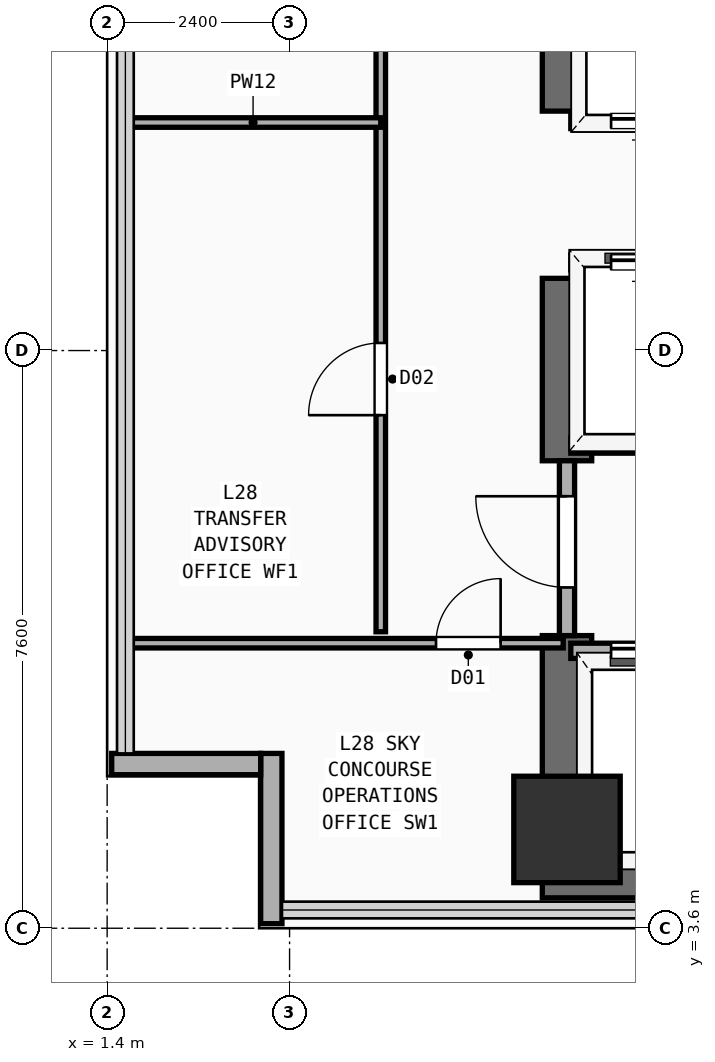
"""IFC4 building model, lengths in metres.
Left out: names, types, materials, properties, quantities, classifications, styles, units other than length and angle.
Written with IfcOpenShell. Run it as: python <this file> out.ifc"""

import sys

from ifc_helpers import new_model, si_unit, direction, frame, frame_2d, origin, origin_2d, place, context, subcontext, project, spatial, rectangle, extrude, element, fill, save


model = new_model("IFC4")
c1 = context("Model", 3, precision=1e-05, world=origin(), true_north=direction((0.0, 1.0)))
c2 = subcontext(c1, "Body", "Model", "MODEL_VIEW")
j1 = project(units=[si_unit("LENGTHUNIT", "METRE"), si_unit("PLANEANGLEUNIT", "RADIAN")], contexts=[c1])
p1 = place(None, origin())
s1 = spatial("IfcSite", under=j1, at=p1, CompositionType="ELEMENT")
p2 = place(p1, origin())
s2 = spatial("IfcBuilding", under=s1, at=p2, CompositionType="ELEMENT")
p3 = place(p2, frame((0.0, 0.0, 110.7)))
s3 = spatial("IfcBuildingStorey", under=s2, at=p3, CompositionType="ELEMENT", Elevation=110.7)
p4 = place(p3, frame((7.125, 4.325, 0.0), z_axis=(0.0, 0.0, 1.0), x_axis=(1.0, 0.0, 0.0)))
e1 = element("IfcWall", 1, at=p4, inside=s3, PredefinedType="SHEAR", context=c2, shape_type="SweptSolid", body=[
    extrude(rectangle(XDim=14.0, YDim=0.65, at=frame_2d((7.0, 0.0))), origin(), (0.0, 0.0, 1.0), 3.54),
])
p5 = place(p3, frame((7.45, 4.65, 0.0), z_axis=(0.0, 0.0, 1.0), x_axis=(0.0, 1.0, 0.0)))
e2 = element("IfcWall", 2, at=p5, inside=s3, PredefinedType="SHEAR", context=c2, shape_type="SweptSolid", body=[
    extrude(rectangle(XDim=2.8, YDim=0.65, at=frame_2d((1.4, 0.0))), origin(), (0.0, 0.0, 1.0), 3.54),
])
p6 = place(p3, frame((7.45, 9.75, 0.0), z_axis=(0.0, 0.0, 1.0), x_axis=(0.0, 1.0, 0.0)))
e3 = element("IfcWall", 3, at=p6, inside=s3, PredefinedType="SHEAR", context=c2, shape_type="SweptSolid", body=[
    extrude(rectangle(XDim=2.4, YDim=0.65, at=frame_2d((1.2, 0.0))), origin(), (0.0, 0.0, 1.0), 3.54),
])
p7 = place(p3, frame((7.45, 14.35, 0.0), z_axis=(0.0, 0.0, 1.0), x_axis=(0.0, 1.0, 0.0)))
e4 = element("IfcWall", 4, at=p7, inside=s3, PredefinedType="SHEAR", context=c2, shape_type="SweptSolid", body=[
    extrude(rectangle(XDim=4.81, YDim=0.65, at=frame_2d((2.405, 0.0))), origin(), (0.0, 0.0, 1.0), 3.54),
])
p8 = place(p3, frame((7.45, 4.9, 0.0), z_axis=(0.0, 0.0, 1.0), x_axis=(1.0, 0.0, 0.0)))
e5 = element("IfcColumn", 5, at=p8, inside=s3, PredefinedType="COLUMN", context=c2, shape_type="SweptSolid", body=[
    extrude(rectangle(XDim=1.4, YDim=1.4, at=origin_2d()), origin(), (0.0, 0.0, 1.0), 3.54),
])
p9 = place(p3, frame((3.56, 3.66, 0.0), z_axis=(0.0, 0.0, 1.0), x_axis=(0.0, 1.0, 0.0)))
e6 = element("IfcWall", 6, at=p9, inside=s3, PredefinedType="SOLIDWALL", context=c2, shape_type="SweptSolid", body=[
    extrude(rectangle(XDim=2.24, YDim=0.28, at=frame_2d((1.12, 0.0))), origin(), (0.0, 0.0, 1.0), 3.54),
])
p10 = place(p3, frame((1.46, 5.76, 0.0), z_axis=(0.0, 0.0, 1.0), x_axis=(1.0, 0.0, 0.0)))
e7 = element("IfcWall", 7, at=p10, inside=s3, PredefinedType="SOLIDWALL", context=c2, shape_type="SweptSolid", body=[
    extrude(rectangle(XDim=1.96, YDim=0.28, at=frame_2d((0.98, 0.0))), origin(), (0.0, 0.0, 1.0), 3.54),
])
p11 = place(p3, frame((7.5, 7.25, 0.0), z_axis=(0.0, 0.0, 1.0), x_axis=(1.0, 0.0, 0.0)))
e8 = element("IfcWall", 8, at=p11, inside=s3, PredefinedType="PARTITIONING", context=c2, shape_type="SweptSolid", body=[
    extrude(rectangle(XDim=8.35, YDim=0.2, at=frame_2d((4.175, 0.0))), origin(), (0.0, 0.0, 1.0), 3.54),
])
p12 = place(p11, frame((0.53, 0.0, 0.0)))
e9 = element("IfcOpeningElement", 9, at=p12, cuts=e8, PredefinedType="OPENING", context=c2, shape_type="SweptSolid", body=[
    extrude(rectangle(XDim=1.1, YDim=2.2, at=frame_2d((0.55, 1.1))), frame((0.0, 0.11, 0.0), z_axis=(0.0, -1.0, 0.0), x_axis=(1.0, 0.0, 0.0)), (0.0, 0.0, 1.0), 0.22),
])
p13 = place(p11, frame((2.37, 0.0, 0.0)))
e10 = element("IfcOpeningElement", 10, at=p13, cuts=e8, PredefinedType="OPENING", context=c2, shape_type="SweptSolid", body=[
    extrude(rectangle(XDim=1.1, YDim=2.2, at=frame_2d((0.55, 1.1))), frame((0.0, 0.11, 0.0), z_axis=(0.0, -1.0, 0.0), x_axis=(1.0, 0.0, 0.0)), (0.0, 0.0, 1.0), 0.22),
])
p14 = place(p11, frame((4.33, 0.0, 0.0)))
e11 = element("IfcOpeningElement", 11, at=p14, cuts=e8, PredefinedType="OPENING", context=c2, shape_type="SweptSolid", body=[
    extrude(rectangle(XDim=1.1, YDim=2.2, at=frame_2d((0.55, 1.1))), frame((0.0, 0.11, 0.0), z_axis=(0.0, -1.0, 0.0), x_axis=(1.0, 0.0, 0.0)), (0.0, 0.0, 1.0), 0.22),
])
p15 = place(p11, frame((6.5, 0.0, 0.0)))
e12 = element("IfcOpeningElement", 12, at=p15, cuts=e8, PredefinedType="OPENING", context=c2, shape_type="SweptSolid", body=[
    extrude(rectangle(XDim=1.1, YDim=2.2, at=frame_2d((0.55, 1.1))), frame((0.0, 0.11, 0.0), z_axis=(0.0, -1.0, 0.0), x_axis=(1.0, 0.0, 0.0)), (0.0, 0.0, 1.0), 0.22),
])
p16 = place(p3, frame((7.5, 9.95, 0.0), z_axis=(0.0, 0.0, 1.0), x_axis=(1.0, 0.0, 0.0)))
e13 = element("IfcWall", 13, at=p16, inside=s3, PredefinedType="PARTITIONING", context=c2, shape_type="SweptSolid", body=[
    extrude(rectangle(XDim=8.35, YDim=0.2, at=frame_2d((4.175, 0.0))), origin(), (0.0, 0.0, 1.0), 3.54),
])
p17 = place(p3, frame((7.45, 7.45, 0.0), z_axis=(0.0, 0.0, 1.0), x_axis=(0.0, 1.0, 0.0)))
e14 = element("IfcWall", 14, at=p17, inside=s3, PredefinedType="PARTITIONING", context=c2, shape_type="SweptSolid", body=[
    extrude(rectangle(XDim=2.3, YDim=0.2, at=frame_2d((1.15, 0.0))), origin(), (0.0, 0.0, 1.0), 2.52),
])
p18 = place(p17, frame((0.633, 0.0, 0.0)))
e15 = element("IfcOpeningElement", 15, at=p18, cuts=e14, PredefinedType="OPENING", context=c2, shape_type="SweptSolid", body=[
    extrude(rectangle(XDim=1.2, YDim=2.25, at=frame_2d((0.6, 1.125))), frame((0.0, 0.11, 0.0), z_axis=(0.0, -1.0, 0.0), x_axis=(1.0, 0.0, 0.0)), (0.0, 0.0, 1.0), 0.22),
])
p19 = place(p3, frame((7.5, 12.36, 0.0), z_axis=(0.0, 0.0, 1.0), x_axis=(1.0, 0.0, 0.0)))
e16 = element("IfcWall", 16, at=p19, inside=s3, PredefinedType="PARTITIONING", context=c2, shape_type="SweptSolid", body=[
    extrude(rectangle(XDim=7.85, YDim=0.2, at=frame_2d((3.925, 0.0))), origin(), (0.0, 0.0, 1.0), 3.54),
])
p20 = place(p19, frame((0.53, 0.0, 0.0)))
e17 = element("IfcOpeningElement", 17, at=p20, cuts=e16, PredefinedType="OPENING", context=c2, shape_type="SweptSolid", body=[
    extrude(rectangle(XDim=1.1, YDim=2.2, at=frame_2d((0.55, 1.1))), frame((0.0, 0.11, 0.0), z_axis=(0.0, -1.0, 0.0), x_axis=(1.0, 0.0, 0.0)), (0.0, 0.0, 1.0), 0.22),
])
p21 = place(p19, frame((2.42, 0.0, 0.0)))
e18 = element("IfcOpeningElement", 18, at=p21, cuts=e16, PredefinedType="OPENING", context=c2, shape_type="SweptSolid", body=[
    extrude(rectangle(XDim=1.1, YDim=2.2, at=frame_2d((0.55, 1.1))), frame((0.0, 0.11, 0.0), z_axis=(0.0, -1.0, 0.0), x_axis=(1.0, 0.0, 0.0)), (0.0, 0.0, 1.0), 0.22),
])
p22 = place(p19, frame((4.31, 0.0, 0.0)))
e19 = element("IfcOpeningElement", 19, at=p22, cuts=e16, PredefinedType="OPENING", context=c2, shape_type="SweptSolid", body=[
    extrude(rectangle(XDim=1.1, YDim=2.2, at=frame_2d((0.55, 1.1))), frame((0.0, 0.11, 0.0), z_axis=(0.0, -1.0, 0.0), x_axis=(1.0, 0.0, 0.0)), (0.0, 0.0, 1.0), 0.22),
])
p23 = place(p19, frame((6.2, 0.0, 0.0)))
e20 = element("IfcOpeningElement", 20, at=p23, cuts=e16, PredefinedType="OPENING", context=c2, shape_type="SweptSolid", body=[
    extrude(rectangle(XDim=1.1, YDim=2.2, at=frame_2d((0.55, 1.1))), frame((0.0, 0.11, 0.0), z_axis=(0.0, -1.0, 0.0), x_axis=(1.0, 0.0, 0.0)), (0.0, 0.0, 1.0), 0.22),
])
p24 = place(p3, frame((7.5, 14.22, 0.0), z_axis=(0.0, 0.0, 1.0), x_axis=(1.0, 0.0, 0.0)))
e21 = element("IfcWall", 21, at=p24, inside=s3, PredefinedType="PARTITIONING", context=c2, shape_type="SweptSolid", body=[
    extrude(rectangle(XDim=7.85, YDim=0.2, at=frame_2d((3.925, 0.0))), origin(), (0.0, 0.0, 1.0), 3.54),
])
p25 = place(p24, frame((0.53, 0.0, 0.0)))
e22 = element("IfcOpeningElement", 22, at=p25, cuts=e21, PredefinedType="OPENING", context=c2, shape_type="SweptSolid", body=[
    extrude(rectangle(XDim=1.1, YDim=2.2, at=frame_2d((0.55, 1.1))), frame((0.0, 0.11, 0.0), z_axis=(0.0, -1.0, 0.0), x_axis=(1.0, 0.0, 0.0)), (0.0, 0.0, 1.0), 0.22),
])
p26 = place(p24, frame((2.42, 0.0, 0.0)))
e23 = element("IfcOpeningElement", 23, at=p26, cuts=e21, PredefinedType="OPENING", context=c2, shape_type="SweptSolid", body=[
    extrude(rectangle(XDim=1.1, YDim=2.2, at=frame_2d((0.55, 1.1))), frame((0.0, 0.11, 0.0), z_axis=(0.0, -1.0, 0.0), x_axis=(1.0, 0.0, 0.0)), (0.0, 0.0, 1.0), 0.22),
])
p27 = place(p24, frame((4.31, 0.0, 0.0)))
e24 = element("IfcOpeningElement", 24, at=p27, cuts=e21, PredefinedType="OPENING", context=c2, shape_type="SweptSolid", body=[
    extrude(rectangle(XDim=1.1, YDim=2.2, at=frame_2d((0.55, 1.1))), frame((0.0, 0.11, 0.0), z_axis=(0.0, -1.0, 0.0), x_axis=(1.0, 0.0, 0.0)), (0.0, 0.0, 1.0), 0.22),
])
p28 = place(p24, frame((6.2, 0.0, 0.0)))
e25 = element("IfcOpeningElement", 25, at=p28, cuts=e21, PredefinedType="OPENING", context=c2, shape_type="SweptSolid", body=[
    extrude(rectangle(XDim=1.1, YDim=2.2, at=frame_2d((0.55, 1.1))), frame((0.0, 0.11, 0.0), z_axis=(0.0, -1.0, 0.0), x_axis=(1.0, 0.0, 0.0)), (0.0, 0.0, 1.0), 0.22),
])
p29 = place(p3, frame((1.64, 7.35, 0.0), z_axis=(0.0, 0.0, 1.0), x_axis=(1.0, 0.0, 0.0)))
e26 = element("IfcWall", 26, at=p29, inside=s3, PredefinedType="PARTITIONING", context=c2, shape_type="SweptSolid", body=[
    extrude(rectangle(XDim=5.76, YDim=0.125, at=frame_2d((2.88, 0.0))), origin(), (0.0, 0.0, 1.0), 3.54),
])
p30 = place(p29, frame((4.087, 0.0, 0.0)))
e27 = element("IfcOpeningElement", 27, at=p30, cuts=e26, PredefinedType="OPENING", context=c2, shape_type="SweptSolid", body=[
    extrude(rectangle(XDim=0.85, YDim=2.15, at=frame_2d((0.425, 1.075))), frame((0.0, 0.073, 0.0), z_axis=(0.0, -1.0, 0.0), x_axis=(1.0, 0.0, 0.0)), (0.0, 0.0, 1.0), 0.145),
])
p31 = place(p3, frame((5.0, 7.5, 0.0), z_axis=(0.0, 0.0, 1.0), x_axis=(0.0, 1.0, 0.0)))
e28 = element("IfcWall", 28, at=p31, inside=s3, PredefinedType="PARTITIONING", context=c2, shape_type="SweptSolid", body=[
    extrude(rectangle(XDim=17.75, YDim=0.125, at=frame_2d((8.875, 0.0))), origin(), (0.0, 0.0, 1.0), 3.54),
])
p32 = place(p31, frame((2.85, 0.0, 0.0)))
e29 = element("IfcOpeningElement", 29, at=p32, cuts=e28, PredefinedType="OPENING", context=c2, shape_type="SweptSolid", body=[
    extrude(rectangle(XDim=0.95, YDim=2.15, at=frame_2d((0.475, 1.075))), frame((0.0, 0.073, 0.0), z_axis=(0.0, -1.0, 0.0), x_axis=(1.0, 0.0, 0.0)), (0.0, 0.0, 1.0), 0.145),
])
p33 = place(p31, frame((11.821, 0.0, 0.0)))
e30 = element("IfcOpeningElement", 30, at=p33, cuts=e28, PredefinedType="OPENING", context=c2, shape_type="SweptSolid", body=[
    extrude(rectangle(XDim=0.95, YDim=2.15, at=frame_2d((0.475, 1.075))), frame((0.0, 0.073, 0.0), z_axis=(0.0, -1.0, 0.0), x_axis=(1.0, 0.0, 0.0)), (0.0, 0.0, 1.0), 0.145),
])
p34 = place(p3, frame((1.64, 14.2, 0.0), z_axis=(0.0, 0.0, 1.0), x_axis=(1.0, 0.0, 0.0)))
e31 = element("IfcWall", 31, at=p34, inside=s3, PredefinedType="PARTITIONING", context=c2, shape_type="SweptSolid", body=[
    extrude(rectangle(XDim=3.36, YDim=0.125, at=frame_2d((1.68, 0.0))), origin(), (0.0, 0.0, 1.0), 3.54),
])
p35 = place(p12, origin())
e32 = element("IfcDoor", 32, at=p35, inside=s3, OperationType="SLIDING_TO_LEFT", PredefinedType="DOOR", context=c2, shape_type="SweptSolid", body=[
    extrude(rectangle(XDim=1.1, YDim=2.2, at=frame_2d((0.55, 1.1))), frame((0.0, 0.025, 0.0), z_axis=(0.0, -1.0, 0.0), x_axis=(1.0, 0.0, 0.0)), (0.0, 0.0, 1.0), 0.05),
])
fill(e9, e32)
p36 = place(p18, frame((1.2, 0.0, 0.0), z_axis=(0.0, 0.0, 1.0), x_axis=(-1.0, 0.0, 0.0)))
e33 = element("IfcDoor", 33, at=p36, inside=s3, OperationType="SINGLE_SWING_LEFT", PredefinedType="DOOR", context=c2, shape_type="SweptSolid", body=[
    extrude(rectangle(XDim=1.2, YDim=2.25, at=frame_2d((0.6, 1.125))), frame((0.0, 0.025, 0.0), z_axis=(0.0, -1.0, 0.0), x_axis=(1.0, 0.0, 0.0)), (0.0, 0.0, 1.0), 0.05),
])
fill(e15, e33)
p37 = place(p20, origin())
e34 = element("IfcDoor", 34, at=p37, inside=s3, OperationType="SLIDING_TO_LEFT", PredefinedType="DOOR", context=c2, shape_type="SweptSolid", body=[
    extrude(rectangle(XDim=1.1, YDim=2.2, at=frame_2d((0.55, 1.1))), frame((0.0, 0.025, 0.0), z_axis=(0.0, -1.0, 0.0), x_axis=(1.0, 0.0, 0.0)), (0.0, 0.0, 1.0), 0.05),
])
fill(e17, e34)
p38 = place(p25, frame((1.1, 0.0, 0.0), z_axis=(0.0, 0.0, 1.0), x_axis=(-1.0, 0.0, 0.0)))
e35 = element("IfcDoor", 35, at=p38, inside=s3, OperationType="SLIDING_TO_LEFT", PredefinedType="DOOR", context=c2, shape_type="SweptSolid", body=[
    extrude(rectangle(XDim=1.1, YDim=2.2, at=frame_2d((0.55, 1.1))), frame((0.0, 0.025, 0.0), z_axis=(0.0, -1.0, 0.0), x_axis=(1.0, 0.0, 0.0)), (0.0, 0.0, 1.0), 0.05),
])
fill(e22, e35)
p39 = place(p30, origin())
e36 = element("IfcDoor", 36, at=p39, inside=s3, OperationType="SINGLE_SWING_RIGHT", PredefinedType="DOOR", context=c2, shape_type="SweptSolid", body=[
    extrude(rectangle(XDim=0.85, YDim=2.15, at=frame_2d((0.425, 1.075))), frame((0.0, 0.025, 0.0), z_axis=(0.0, -1.0, 0.0), x_axis=(1.0, 0.0, 0.0)), (0.0, 0.0, 1.0), 0.05),
])
fill(e27, e36)
p40 = place(p32, origin())
e37 = element("IfcDoor", 37, at=p40, inside=s3, OperationType="SINGLE_SWING_LEFT", PredefinedType="DOOR", context=c2, shape_type="SweptSolid", body=[
    extrude(rectangle(XDim=0.95, YDim=2.15, at=frame_2d((0.475, 1.075))), frame((0.0, 0.025, 0.0), z_axis=(0.0, -1.0, 0.0), x_axis=(1.0, 0.0, 0.0)), (0.0, 0.0, 1.0), 0.05),
])
fill(e29, e37)
save(model, sys.argv[1])
